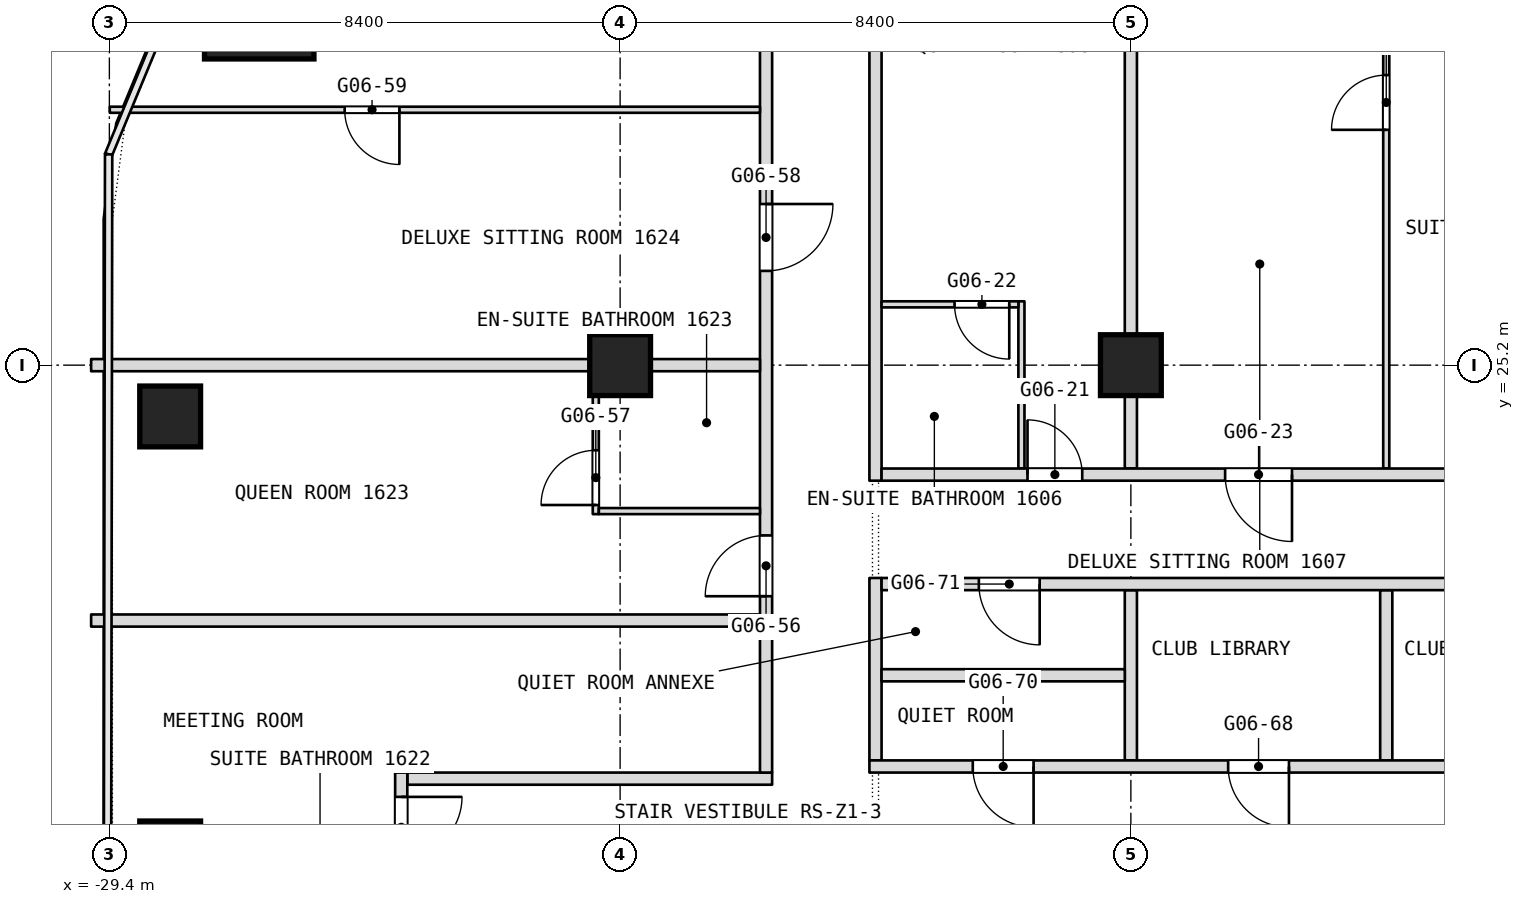
"""IFC4 building model, lengths in metres.
Left out: names, types, materials, properties, quantities, classifications, styles, units other than length and angle.
Written with IfcOpenShell. Run it as: python <this file> out.ifc"""

import sys

from ifc_helpers import new_model, si_unit, direction, frame, frame_2d, origin, origin_2d, place, context, subcontext, project, spatial, rectangle, extrude, element, fill, save


model = new_model("IFC4")
c1 = context("Model", 3, precision=1e-05, world=origin(), true_north=direction((0.0, 1.0)))
c2 = subcontext(c1, "Body", "Model", "MODEL_VIEW")
j1 = project(units=[si_unit("LENGTHUNIT", "METRE"), si_unit("PLANEANGLEUNIT", "RADIAN")], contexts=[c1])
p1 = place(None, origin())
s1 = spatial("IfcSite", under=j1, at=p1, CompositionType="ELEMENT")
p2 = place(p1, origin())
s2 = spatial("IfcBuilding", under=s1, at=p2, CompositionType="ELEMENT")
p3 = place(p2, frame((0.0, 0.0, 72.5)))
s3 = spatial("IfcBuildingStorey", under=s2, at=p3, CompositionType="ELEMENT", Elevation=72.5)
p4 = place(p3, frame((-26.936, 31.135, 0.0), z_axis=(0.0, 0.0, 1.0), x_axis=(1.0, 0.0, 0.0)))
e1 = element("IfcColumn", 1, at=p4, inside=s3, PredefinedType="COLUMN", context=c2, shape_type="SweptSolid", body=[
    extrude(rectangle(XDim=1.8, YDim=1.8, at=origin_2d()), origin(), (0.0, 0.0, 1.0), 3.6),
])
for number, where, z_axis, x_axis in (
    (2, (-21.0, 25.2, 0.0), (0.0, 0.0, 1.0), (1.0, 0.0, 0.0)),
    (3, (-12.6, 25.2, 0.0), (0.0, 0.0, 1.0), (1.0, 0.0, 0.0)),
    (4, (-28.4, 17.203, 0.0), (0.0, 0.0, 1.0), (1.0, 0.0, 0.0)),
    (5, (-28.4, 24.356, 0.0), (0.0, 0.0, 1.0), (1.0, 0.0, 0.0)),
):
    element("IfcColumn", number, at=place(p3, frame(where, z_axis=z_axis, x_axis=x_axis)), inside=s3, PredefinedType="COLUMN", context=c2, shape_type="SweptSolid", body=[
        extrude(rectangle(XDim=1.0, YDim=1.0, at=origin_2d()), origin(), (0.0, 0.0, 1.0), 3.6),
    ])
p5 = place(p3, frame((-8.4, 18.7, 0.0), z_axis=(0.0, 0.0, 1.0), x_axis=(0.0, 1.0, 0.0)))
e6 = element("IfcWall", 6, at=p5, inside=s3, PredefinedType="PARTITIONING", context=c2, shape_type="SweptSolid", body=[
    extrude(rectangle(XDim=2.8, YDim=0.2, at=frame_2d((1.4, 0.0))), origin(), (0.0, 0.0, 1.0), 3.34),
])
p6 = place(p3, frame((-8.4, 23.5, 0.0), z_axis=(0.0, 0.0, 1.0), x_axis=(0.0, 1.0, 0.0)))
e7 = element("IfcWall", 7, at=p6, inside=s3, PredefinedType="PARTITIONING", context=c2, shape_type="SweptSolid", body=[
    extrude(rectangle(XDim=10.04, YDim=0.1, at=frame_2d((5.02, 0.0))), origin(), (0.0, 0.0, 1.0), 3.34),
])
p7 = place(p6, frame((5.57, 0.0, 0.0)))
e8 = element("IfcOpeningElement", 8, at=p7, cuts=e7, PredefinedType="OPENING", context=c2, shape_type="SweptSolid", body=[
    extrude(rectangle(XDim=0.9, YDim=2.1, at=frame_2d((0.45, 1.05))), frame((0.0, 0.05, 0.0), z_axis=(0.0, -1.0, 0.0), x_axis=(1.0, 0.0, 0.0)), (0.0, 0.0, 1.0), 0.1),
])
p8 = place(p3, frame((-12.6, 18.7, 0.0), z_axis=(0.0, 0.0, 1.0), x_axis=(0.0, 1.0, 0.0)))
e9 = element("IfcWall", 9, at=p8, inside=s3, PredefinedType="PARTITIONING", context=c2, shape_type="SweptSolid", body=[
    extrude(rectangle(XDim=2.8, YDim=0.2, at=frame_2d((1.4, 0.0))), origin(), (0.0, 0.0, 1.0), 3.34),
])
p9 = place(p3, frame((-12.6, 23.5, 0.0), z_axis=(0.0, 0.0, 1.0), x_axis=(0.0, 1.0, 0.0)))
e10 = element("IfcWall", 10, at=p9, inside=s3, PredefinedType="PARTITIONING", context=c2, shape_type="SweptSolid", body=[
    extrude(rectangle(XDim=10.04, YDim=0.2, at=frame_2d((5.02, 0.0))), origin(), (0.0, 0.0, 1.0), 3.34),
])
p10 = place(p3, frame((-14.4, 23.5, 0.0), z_axis=(0.0, 0.0, 1.0), x_axis=(0.0, 1.0, 0.0)))
e11 = element("IfcWall", 11, at=p10, inside=s3, PredefinedType="PARTITIONING", context=c2, shape_type="SweptSolid", body=[
    extrude(rectangle(XDim=2.75, YDim=0.1, at=frame_2d((1.375, 0.0))), origin(), (0.0, 0.0, 1.0), 3.34),
])
p11 = place(p3, frame((-16.8, 18.7, 0.0), z_axis=(0.0, 0.0, 1.0), x_axis=(0.0, 1.0, 0.0)))
e12 = element("IfcWall", 12, at=p11, inside=s3, PredefinedType="PARTITIONING", context=c2, shape_type="SweptSolid", body=[
    extrude(rectangle(XDim=3.0, YDim=0.2, at=frame_2d((1.5, 0.0))), origin(), (0.0, 0.0, 1.0), 3.34),
])
p12 = place(p3, frame((-16.8, 23.3, 0.0), z_axis=(0.0, 0.0, 1.0), x_axis=(0.0, 1.0, 0.0)))
e13 = element("IfcWall", 13, at=p12, inside=s3, PredefinedType="PARTITIONING", context=c2, shape_type="SweptSolid", body=[
    extrude(rectangle(XDim=10.24, YDim=0.2, at=frame_2d((5.12, 0.0))), origin(), (0.0, 0.0, 1.0), 3.34),
])
p13 = place(p3, frame((-24.5, 18.4, 0.0), z_axis=(0.0, 0.0, 1.0), x_axis=(1.0, 0.0, 0.0)))
e14 = element("IfcWall", 14, at=p13, inside=s3, PredefinedType="PARTITIONING", context=c2, shape_type="SweptSolid", body=[
    extrude(rectangle(XDim=6.0, YDim=0.2, at=frame_2d((3.0, 0.0))), origin(), (0.0, 0.0, 1.0), 3.34),
])
p14 = place(p3, frame((-18.6, 18.5, 0.0), z_axis=(0.0, 0.0, 1.0), x_axis=(0.0, 1.0, 0.0)))
e15 = element("IfcWall", 15, at=p14, inside=s3, PredefinedType="PARTITIONING", context=c2, shape_type="SweptSolid", body=[
    extrude(rectangle(XDim=15.04, YDim=0.2, at=frame_2d((7.52, 0.0))), origin(), (0.0, 0.0, 1.0), 3.34),
])
p15 = place(p14, frame((2.9, 0.0, 0.0)))
e16 = element("IfcOpeningElement", 16, at=p15, cuts=e15, PredefinedType="OPENING", context=c2, shape_type="SweptSolid", body=[
    extrude(rectangle(XDim=1.0, YDim=2.1, at=frame_2d((0.5, 1.05))), frame((0.0, 0.1, 0.0), z_axis=(0.0, -1.0, 0.0), x_axis=(1.0, 0.0, 0.0)), (0.0, 0.0, 1.0), 0.2),
])
p16 = place(p14, frame((8.25, 0.0, 0.0)))
e17 = element("IfcOpeningElement", 17, at=p16, cuts=e15, PredefinedType="OPENING", context=c2, shape_type="SweptSolid", body=[
    extrude(rectangle(XDim=1.1, YDim=2.1, at=frame_2d((0.55, 1.05))), frame((0.0, 0.1, 0.0), z_axis=(0.0, -1.0, 0.0), x_axis=(1.0, 0.0, 0.0)), (0.0, 0.0, 1.0), 0.2),
])
p17 = place(p3, frame((-16.9, 18.6, 0.0), z_axis=(0.0, 0.0, 1.0), x_axis=(1.0, 0.0, 0.0)))
e18 = element("IfcWall", 18, at=p17, inside=s3, PredefinedType="PARTITIONING", context=c2, shape_type="SweptSolid", body=[
    extrude(rectangle(XDim=25.1, YDim=0.2, at=frame_2d((12.55, 0.0))), origin(), (0.0, 0.0, 1.0), 3.34),
])
p18 = place(p17, frame((16.0, 0.0, 0.0)))
e19 = element("IfcOpeningElement", 19, at=p18, cuts=e18, PredefinedType="OPENING", context=c2, shape_type="SweptSolid", body=[
    extrude(rectangle(XDim=1.8, YDim=2.1, at=frame_2d((0.9, 1.05))), frame((0.0, 0.1, 0.0), z_axis=(0.0, -1.0, 0.0), x_axis=(1.0, 0.0, 0.0)), (0.0, 0.0, 1.0), 0.2),
])
p19 = place(p17, frame((5.9, 0.0, 0.0)))
e20 = element("IfcOpeningElement", 20, at=p19, cuts=e18, PredefinedType="OPENING", context=c2, shape_type="SweptSolid", body=[
    extrude(rectangle(XDim=1.0, YDim=2.1, at=frame_2d((0.5, 1.05))), frame((0.0, 0.1, 0.0), z_axis=(0.0, -1.0, 0.0), x_axis=(1.0, 0.0, 0.0)), (0.0, 0.0, 1.0), 0.2),
])
p20 = place(p17, frame((10.1, 0.0, 0.0)))
e21 = element("IfcOpeningElement", 21, at=p20, cuts=e18, PredefinedType="OPENING", context=c2, shape_type="SweptSolid", body=[
    extrude(rectangle(XDim=1.0, YDim=2.1, at=frame_2d((0.5, 1.05))), frame((0.0, 0.1, 0.0), z_axis=(0.0, -1.0, 0.0), x_axis=(1.0, 0.0, 0.0)), (0.0, 0.0, 1.0), 0.2),
])
p21 = place(p17, frame((1.7, 0.0, 0.0)))
e22 = element("IfcOpeningElement", 22, at=p21, cuts=e18, PredefinedType="OPENING", context=c2, shape_type="SweptSolid", body=[
    extrude(rectangle(XDim=1.0, YDim=2.1, at=frame_2d((0.5, 1.05))), frame((0.0, 0.1, 0.0), z_axis=(0.0, -1.0, 0.0), x_axis=(1.0, 0.0, 0.0)), (0.0, 0.0, 1.0), 0.2),
])
p22 = place(p17, frame((22.55, 0.0, 0.0)))
e23 = element("IfcOpeningElement", 23, at=p22, cuts=e18, PredefinedType="OPENING", context=c2, shape_type="SweptSolid", body=[
    extrude(rectangle(XDim=1.0, YDim=2.1, at=frame_2d((0.5, 1.05))), frame((0.0, 0.1, 0.0), z_axis=(0.0, -1.0, 0.0), x_axis=(1.0, 0.0, 0.0)), (0.0, 0.0, 1.0), 0.2),
])
p23 = place(p3, frame((-16.7, 20.1, 0.0), z_axis=(0.0, 0.0, 1.0), x_axis=(1.0, 0.0, 0.0)))
e24 = element("IfcWall", 24, at=p23, inside=s3, PredefinedType="PARTITIONING", context=c2, shape_type="SweptSolid", body=[
    extrude(rectangle(XDim=4.0, YDim=0.2, at=frame_2d((2.0, 0.0))), origin(), (0.0, 0.0, 1.0), 3.34),
])
p24 = place(p3, frame((-29.7, 21.0, 0.0), z_axis=(0.0, 0.0, 1.0), x_axis=(1.0, 0.0, 0.0)))
e25 = element("IfcWall", 25, at=p24, inside=s3, PredefinedType="PARTITIONING", context=c2, shape_type="SweptSolid", body=[
    extrude(rectangle(XDim=11.0, YDim=0.2, at=frame_2d((5.5, 0.0))), origin(), (0.0, 0.0, 1.0), 3.34),
])
p25 = place(p3, frame((-21.4, 22.75, 0.0), z_axis=(0.0, 0.0, 1.0), x_axis=(0.0, 1.0, 0.0)))
e26 = element("IfcWall", 26, at=p25, inside=s3, PredefinedType="PARTITIONING", context=c2, shape_type="SweptSolid", body=[
    extrude(rectangle(XDim=2.55, YDim=0.1, at=frame_2d((1.275, 0.0))), origin(), (0.0, 0.0, 1.0), 3.34),
])
p26 = place(p25, frame((0.15, 0.0, 0.0)))
e27 = element("IfcOpeningElement", 27, at=p26, cuts=e26, PredefinedType="OPENING", context=c2, shape_type="SweptSolid", body=[
    extrude(rectangle(XDim=0.9, YDim=2.1, at=frame_2d((0.45, 1.05))), frame((0.0, 0.05, 0.0), z_axis=(0.0, -1.0, 0.0), x_axis=(1.0, 0.0, 0.0)), (0.0, 0.0, 1.0), 0.1),
])
p27 = place(p3, frame((-16.7, 21.6, 0.0), z_axis=(0.0, 0.0, 1.0), x_axis=(1.0, 0.0, 0.0)))
e28 = element("IfcWall", 28, at=p27, inside=s3, PredefinedType="PARTITIONING", context=c2, shape_type="SweptSolid", body=[
    extrude(rectangle(XDim=24.7, YDim=0.2, at=frame_2d((12.35, 0.0))), origin(), (0.0, 0.0, 1.0), 3.34),
])
p28 = place(p27, frame((1.6, 0.0, 0.0)))
e29 = element("IfcOpeningElement", 29, at=p28, cuts=e28, PredefinedType="OPENING", context=c2, shape_type="SweptSolid", body=[
    extrude(rectangle(XDim=1.0, YDim=2.1, at=frame_2d((0.5, 1.05))), frame((0.0, 0.1, 0.0), z_axis=(0.0, -1.0, 0.0), x_axis=(1.0, 0.0, 0.0)), (0.0, 0.0, 1.0), 0.2),
])
p29 = place(p27, frame((22.25, 0.0, 0.0)))
e30 = element("IfcOpeningElement", 30, at=p29, cuts=e28, PredefinedType="OPENING", context=c2, shape_type="SweptSolid", body=[
    extrude(rectangle(XDim=1.0, YDim=2.1, at=frame_2d((0.5, 1.05))), frame((0.0, 0.1, 0.0), z_axis=(0.0, -1.0, 0.0), x_axis=(1.0, 0.0, 0.0)), (0.0, 0.0, 1.0), 0.2),
])
p30 = place(p3, frame((-21.35, 22.8, 0.0), z_axis=(0.0, 0.0, 1.0), x_axis=(1.0, 0.0, 0.0)))
e31 = element("IfcWall", 31, at=p30, inside=s3, PredefinedType="PARTITIONING", context=c2, shape_type="SweptSolid", body=[
    extrude(rectangle(XDim=2.65, YDim=0.1, at=frame_2d((1.325, 0.0))), origin(), (0.0, 0.0, 1.0), 3.34),
])
p31 = place(p3, frame((-16.7, 23.4, 0.0), z_axis=(0.0, 0.0, 1.0), x_axis=(1.0, 0.0, 0.0)))
e32 = element("IfcWall", 32, at=p31, inside=s3, PredefinedType="PARTITIONING", context=c2, shape_type="SweptSolid", body=[
    extrude(rectangle(XDim=23.4, YDim=0.2, at=frame_2d((11.7, 0.0))), origin(), (0.0, 0.0, 1.0), 3.34),
])
p32 = place(p31, frame((2.4, 0.0, 0.0)))
e33 = element("IfcOpeningElement", 33, at=p32, cuts=e32, PredefinedType="OPENING", context=c2, shape_type="SweptSolid", body=[
    extrude(rectangle(XDim=0.9, YDim=2.1, at=frame_2d((0.45, 1.05))), frame((0.0, 0.1, 0.0), z_axis=(0.0, -1.0, 0.0), x_axis=(1.0, 0.0, 0.0)), (0.0, 0.0, 1.0), 0.2),
])
p33 = place(p31, frame((5.65, 0.0, 0.0)))
e34 = element("IfcOpeningElement", 34, at=p33, cuts=e32, PredefinedType="OPENING", context=c2, shape_type="SweptSolid", body=[
    extrude(rectangle(XDim=1.1, YDim=2.1, at=frame_2d((0.55, 1.05))), frame((0.0, 0.1, 0.0), z_axis=(0.0, -1.0, 0.0), x_axis=(1.0, 0.0, 0.0)), (0.0, 0.0, 1.0), 0.2),
])
p34 = place(p31, frame((15.3, 0.0, 0.0)))
e35 = element("IfcOpeningElement", 35, at=p34, cuts=e32, PredefinedType="OPENING", context=c2, shape_type="SweptSolid", body=[
    extrude(rectangle(XDim=1.0, YDim=2.1, at=frame_2d((0.5, 1.05))), frame((0.0, 0.1, 0.0), z_axis=(0.0, -1.0, 0.0), x_axis=(1.0, 0.0, 0.0)), (0.0, 0.0, 1.0), 0.2),
])
p35 = place(p31, frame((17.1, 0.0, 0.0)))
e36 = element("IfcOpeningElement", 36, at=p35, cuts=e32, PredefinedType="OPENING", context=c2, shape_type="SweptSolid", body=[
    extrude(rectangle(XDim=1.0, YDim=2.1, at=frame_2d((0.5, 1.05))), frame((0.0, 0.1, 0.0), z_axis=(0.0, -1.0, 0.0), x_axis=(1.0, 0.0, 0.0)), (0.0, 0.0, 1.0), 0.2),
])
p36 = place(p3, frame((-24.6, 6.9, 0.0), z_axis=(0.0, 0.0, 1.0), x_axis=(0.0, 1.0, 0.0)))
e37 = element("IfcWall", 37, at=p36, inside=s3, PredefinedType="PARTITIONING", context=c2, shape_type="SweptSolid", body=[
    extrude(rectangle(XDim=11.6, YDim=0.2, at=frame_2d((5.8, 0.0))), origin(), (0.0, 0.0, 1.0), 3.34),
])
p37 = place(p36, frame((5.1, 0.0, 0.0)))
e38 = element("IfcOpeningElement", 38, at=p37, cuts=e37, PredefinedType="OPENING", context=c2, shape_type="SweptSolid", body=[
    extrude(rectangle(XDim=1.1, YDim=2.1, at=frame_2d((0.55, 1.05))), frame((0.0, 0.1, 0.0), z_axis=(0.0, -1.0, 0.0), x_axis=(1.0, 0.0, 0.0)), (0.0, 0.0, 1.0), 0.2),
])
p38 = place(p36, frame((10.2, 0.0, 0.0)))
e39 = element("IfcOpeningElement", 39, at=p38, cuts=e37, PredefinedType="OPENING", context=c2, shape_type="SweptSolid", body=[
    extrude(rectangle(XDim=1.0, YDim=2.1, at=frame_2d((0.5, 1.05))), frame((0.0, 0.1, 0.0), z_axis=(0.0, -1.0, 0.0), x_axis=(1.0, 0.0, 0.0)), (0.0, 0.0, 1.0), 0.2),
])
p39 = place(p3, frame((-29.7, 25.2, 0.0), z_axis=(0.0, 0.0, 1.0), x_axis=(1.0, 0.0, 0.0)))
e40 = element("IfcWall", 40, at=p39, inside=s3, PredefinedType="PARTITIONING", context=c2, shape_type="SweptSolid", body=[
    extrude(rectangle(XDim=11.0, YDim=0.2, at=frame_2d((5.5, 0.0))), origin(), (0.0, 0.0, 1.0), 2.84),
])
p40 = place(p3, frame((-16.7, 26.2, 0.0), z_axis=(0.0, 0.0, 1.0), x_axis=(1.0, 0.0, 0.0)))
e41 = element("IfcWall", 41, at=p40, inside=s3, PredefinedType="PARTITIONING", context=c2, shape_type="SweptSolid", body=[
    extrude(rectangle(XDim=2.25, YDim=0.1, at=frame_2d((1.125, 0.0))), origin(), (0.0, 0.0, 1.0), 3.34),
])
p41 = place(p40, frame((1.2, 0.0, 0.0)))
e42 = element("IfcOpeningElement", 42, at=p41, cuts=e41, PredefinedType="OPENING", context=c2, shape_type="SweptSolid", body=[
    extrude(rectangle(XDim=0.9, YDim=2.1, at=frame_2d((0.45, 1.05))), frame((0.0, 0.05, 0.0), z_axis=(0.0, -1.0, 0.0), x_axis=(1.0, 0.0, 0.0)), (0.0, 0.0, 1.0), 0.1),
])
p42 = place(p3, frame((-29.393, 29.4, 0.0), z_axis=(0.0, 0.0, 1.0), x_axis=(1.0, 0.0, 0.0)))
e43 = element("IfcWall", 43, at=p42, inside=s3, PredefinedType="PARTITIONING", context=c2, shape_type="SweptSolid", body=[
    extrude(rectangle(XDim=10.693, YDim=0.1, at=frame_2d((5.347, 0.0))), origin(), (0.0, 0.0, 1.0), 3.34),
])
p43 = place(p42, frame((3.863, 0.0, 0.0)))
e44 = element("IfcOpeningElement", 44, at=p43, cuts=e43, PredefinedType="OPENING", context=c2, shape_type="SweptSolid", body=[
    extrude(rectangle(XDim=0.9, YDim=2.1, at=frame_2d((0.45, 1.05))), frame((0.0, 0.05, 0.0), z_axis=(0.0, -1.0, 0.0), x_axis=(1.0, 0.0, 0.0)), (0.0, 0.0, 1.0), 0.1),
])
p44 = place(p7, origin())
e45 = element("IfcDoor", 45, at=p44, inside=s3, OperationType="SINGLE_SWING_RIGHT", PredefinedType="DOOR", context=c2, shape_type="SweptSolid", body=[
    extrude(rectangle(XDim=0.9, YDim=2.1, at=frame_2d((0.45, 1.05))), frame((0.0, 0.025, 0.0), z_axis=(0.0, -1.0, 0.0), x_axis=(1.0, 0.0, 0.0)), (0.0, 0.0, 1.0), 0.05),
])
fill(e8, e45)
p45 = place(p15, origin())
e46 = element("IfcDoor", 46, at=p45, inside=s3, OperationType="SINGLE_SWING_LEFT", PredefinedType="DOOR", context=c2, shape_type="SweptSolid", body=[
    extrude(rectangle(XDim=1.0, YDim=2.1, at=frame_2d((0.5, 1.05))), frame((0.0, 0.025, 0.0), z_axis=(0.0, -1.0, 0.0), x_axis=(1.0, 0.0, 0.0)), (0.0, 0.0, 1.0), 0.05),
])
fill(e16, e46)
p46 = place(p16, origin())
e47 = element("IfcDoor", 47, at=p46, inside=s3, OperationType="SINGLE_SWING_LEFT", PredefinedType="DOOR", context=c2, shape_type="SweptSolid", body=[
    extrude(rectangle(XDim=1.1, YDim=2.1, at=frame_2d((0.55, 1.05))), frame((0.0, 0.025, 0.0), z_axis=(0.0, -1.0, 0.0), x_axis=(1.0, 0.0, 0.0)), (0.0, 0.0, 1.0), 0.05),
])
fill(e17, e47)
p47 = place(p19, origin())
e48 = element("IfcDoor", 48, at=p47, inside=s3, OperationType="SINGLE_SWING_RIGHT", PredefinedType="DOOR", context=c2, shape_type="SweptSolid", body=[
    extrude(rectangle(XDim=1.0, YDim=2.1, at=frame_2d((0.5, 1.05))), frame((0.0, 0.025, 0.0), z_axis=(0.0, -1.0, 0.0), x_axis=(1.0, 0.0, 0.0)), (0.0, 0.0, 1.0), 0.05),
])
fill(e20, e48)
p48 = place(p21, origin())
e49 = element("IfcDoor", 49, at=p48, inside=s3, OperationType="SINGLE_SWING_RIGHT", PredefinedType="DOOR", context=c2, shape_type="SweptSolid", body=[
    extrude(rectangle(XDim=1.0, YDim=2.1, at=frame_2d((0.5, 1.05))), frame((0.0, 0.025, 0.0), z_axis=(0.0, -1.0, 0.0), x_axis=(1.0, 0.0, 0.0)), (0.0, 0.0, 1.0), 0.05),
])
fill(e22, e49)
p49 = place(p26, origin())
e50 = element("IfcDoor", 50, at=p49, inside=s3, OperationType="SINGLE_SWING_RIGHT", PredefinedType="DOOR", context=c2, shape_type="SweptSolid", body=[
    extrude(rectangle(XDim=0.9, YDim=2.1, at=frame_2d((0.45, 1.05))), frame((0.0, 0.025, 0.0), z_axis=(0.0, -1.0, 0.0), x_axis=(1.0, 0.0, 0.0)), (0.0, 0.0, 1.0), 0.05),
])
fill(e27, e50)
p50 = place(p28, origin())
e51 = element("IfcDoor", 51, at=p50, inside=s3, OperationType="SINGLE_SWING_RIGHT", PredefinedType="DOOR", context=c2, shape_type="SweptSolid", body=[
    extrude(rectangle(XDim=1.0, YDim=2.1, at=frame_2d((0.5, 1.05))), frame((0.0, 0.025, 0.0), z_axis=(0.0, -1.0, 0.0), x_axis=(1.0, 0.0, 0.0)), (0.0, 0.0, 1.0), 0.05),
])
fill(e29, e51)
p51 = place(p32, origin())
e52 = element("IfcDoor", 52, at=p51, inside=s3, OperationType="SINGLE_SWING_LEFT", PredefinedType="DOOR", context=c2, shape_type="SweptSolid", body=[
    extrude(rectangle(XDim=0.9, YDim=2.1, at=frame_2d((0.45, 1.05))), frame((0.0, 0.025, 0.0), z_axis=(0.0, -1.0, 0.0), x_axis=(1.0, 0.0, 0.0)), (0.0, 0.0, 1.0), 0.05),
])
fill(e33, e52)
p52 = place(p33, origin())
e53 = element("IfcDoor", 53, at=p52, inside=s3, OperationType="SINGLE_SWING_RIGHT", PredefinedType="DOOR", context=c2, shape_type="SweptSolid", body=[
    extrude(rectangle(XDim=1.1, YDim=2.1, at=frame_2d((0.55, 1.05))), frame((0.0, 0.025, 0.0), z_axis=(0.0, -1.0, 0.0), x_axis=(1.0, 0.0, 0.0)), (0.0, 0.0, 1.0), 0.05),
])
fill(e34, e53)
p53 = place(p38, origin())
e54 = element("IfcDoor", 54, at=p53, inside=s3, OperationType="SINGLE_SWING_RIGHT", PredefinedType="DOOR", context=c2, shape_type="SweptSolid", body=[
    extrude(rectangle(XDim=1.0, YDim=2.1, at=frame_2d((0.5, 1.05))), frame((0.0, 0.025, 0.0), z_axis=(0.0, -1.0, 0.0), x_axis=(1.0, 0.0, 0.0)), (0.0, 0.0, 1.0), 0.05),
])
fill(e39, e54)
p54 = place(p41, origin())
e55 = element("IfcDoor", 55, at=p54, inside=s3, OperationType="SINGLE_SWING_LEFT", PredefinedType="DOOR", context=c2, shape_type="SweptSolid", body=[
    extrude(rectangle(XDim=0.9, YDim=2.1, at=frame_2d((0.45, 1.05))), frame((0.0, 0.025, 0.0), z_axis=(0.0, -1.0, 0.0), x_axis=(1.0, 0.0, 0.0)), (0.0, 0.0, 1.0), 0.05),
])
fill(e42, e55)
p55 = place(p43, origin())
e56 = element("IfcDoor", 56, at=p55, inside=s3, OperationType="SINGLE_SWING_LEFT", PredefinedType="DOOR", context=c2, shape_type="SweptSolid", body=[
    extrude(rectangle(XDim=0.9, YDim=2.1, at=frame_2d((0.45, 1.05))), frame((0.0, 0.025, 0.0), z_axis=(0.0, -1.0, 0.0), x_axis=(1.0, 0.0, 0.0)), (0.0, 0.0, 1.0), 0.05),
])
fill(e44, e56)
save(model, sys.argv[1])
